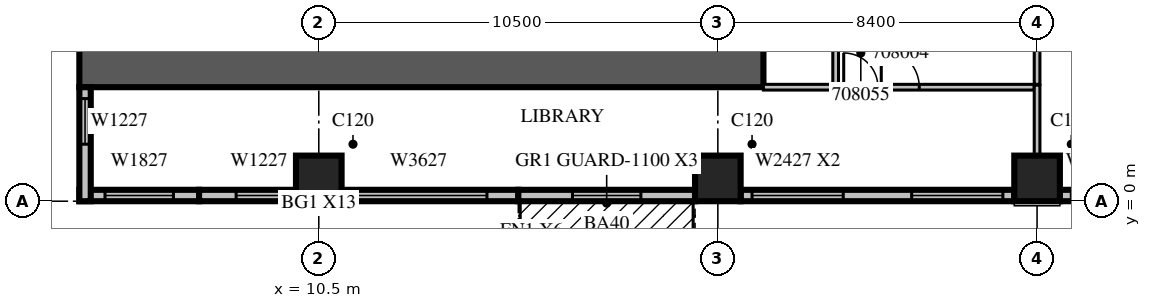
"""IFC4 building model, lengths in metres.
Left out: names, types, materials, properties, quantities, classifications, styles, units other than length and angle.
Written with IfcOpenShell. Run it as: python <this file> out.ifc"""

import sys

from ifc_helpers import new_model, si_unit, direction, frame, frame_2d, origin, origin_2d, place, context, subcontext, project, spatial, rectangle, extrude, source, transform, mapped, element, fill, save


model = new_model("IFC4")
c1 = context("Model", 3, precision=1e-05, world=origin(), true_north=direction((0.0, 1.0)))
c2 = subcontext(c1, "Body", "Model", "MODEL_VIEW")
j1 = project(units=[si_unit("LENGTHUNIT", "METRE"), si_unit("PLANEANGLEUNIT", "RADIAN")], contexts=[c1])
p1 = place(None, origin())
s1 = spatial("IfcSite", under=j1, at=p1, CompositionType="ELEMENT")
p2 = place(p1, origin())
s2 = spatial("IfcBuilding", under=s1, at=p2, CompositionType="ELEMENT")
p3 = place(p2, frame((0.0, 0.0, 44.7)))
s3 = spatial("IfcBuildingStorey", under=s2, at=p3, CompositionType="ELEMENT", Elevation=44.7)
m1 = source(origin(), c2, "Body", "SweptSolid", [
    extrude(rectangle(XDim=1.2, YDim=1.2, at=origin_2d()), origin(), (0.0, 0.0, 1.0), 4.2),
])
for number, where, z_axis, x_axis in (
    (1, (10.5, 0.6, 0.0), (0.0, 0.0, 1.0), (1.0, 0.0, 0.0)),
    (2, (21.0, 0.6, 0.0), (0.0, 0.0, 1.0), (1.0, 0.0, 0.0)),
    (3, (29.4, 0.6, 0.0), (0.0, 0.0, 1.0), (1.0, 0.0, 0.0)),
):
    element("IfcColumn", number, at=place(p3, frame(where, z_axis=z_axis, x_axis=x_axis)), inside=s3, PredefinedType="COLUMN", context=c2, shape_type="MappedRepresentation", body=[
        mapped(m1, transform((0.0, 0.0, 0.0), scale=1.0)),
    ])
m2 = source(origin(), c2, "Body", "SweptSolid", [
    extrude(rectangle(XDim=18.0, YDim=1.2, at=frame_2d((9.0, 0.0))), origin(), (0.0, 0.0, 1.0), 4.2),
])
p4 = place(p3, frame((4.2, 3.6, 0.0), z_axis=(0.0, 0.0, 1.0), x_axis=(1.0, 0.0, 0.0)))
e4 = element("IfcWall", 4, at=p4, inside=s3, PredefinedType="SHEAR", context=c2, shape_type="MappedRepresentation", body=[
    mapped(m2, transform((0.0, 0.0, 0.0), scale=1.0)),
])
m3 = source(origin(), c2, "Body", "SweptSolid", [
    extrude(rectangle(XDim=3.15, YDim=0.3, at=frame_2d((1.575, 0.0))), origin(), (0.0, 0.0, 1.0), 3.8),
])
p5 = place(p3, frame((4.2, 0.15, 0.0), z_axis=(0.0, 0.0, 1.0), x_axis=(1.0, 0.0, 0.0)))
e5 = element("IfcWall", 5, at=p5, inside=s3, PredefinedType="STANDARD", context=c2, shape_type="MappedRepresentation", body=[
    mapped(m3, transform((0.0, 0.0, 0.0), scale=1.0)),
])
m4 = source(origin(), c2, "Body", "SweptSolid", [
    extrude(rectangle(XDim=1.8, YDim=2.7, at=frame_2d((0.9, 1.35))), frame((0.0, 0.16, 0.0), z_axis=(0.0, -1.0, 0.0), x_axis=(1.0, 0.0, 0.0)), (0.0, 0.0, 1.0), 0.32),
])
p6 = place(p5, frame((0.675, 0.0, 0.6)))
e6 = element("IfcOpeningElement", 6, at=p6, cuts=e5, PredefinedType="OPENING", context=c2, shape_type="MappedRepresentation", body=[
    mapped(m4, transform((0.0, 0.0, 0.0), scale=1.0)),
])
m5 = source(origin(), c2, "Body", "SweptSolid", [
    extrude(rectangle(XDim=2.55, YDim=0.3, at=frame_2d((1.275, 0.0))), origin(), (0.0, 0.0, 1.0), 3.8),
])
p7 = place(p3, frame((7.35, 0.15, 0.0), z_axis=(0.0, 0.0, 1.0), x_axis=(1.0, 0.0, 0.0)))
e7 = element("IfcWall", 7, at=p7, inside=s3, PredefinedType="STANDARD", context=c2, shape_type="MappedRepresentation", body=[
    mapped(m5, transform((0.0, 0.0, 0.0), scale=1.0)),
])
m6 = source(origin(), c2, "Body", "SweptSolid", [
    extrude(rectangle(XDim=1.2, YDim=2.7, at=frame_2d((0.6, 1.35))), frame((0.0, 0.16, 0.0), z_axis=(0.0, -1.0, 0.0), x_axis=(1.0, 0.0, 0.0)), (0.0, 0.0, 1.0), 0.32),
])
p8 = place(p7, frame((0.975, 0.0, 0.6)))
e8 = element("IfcOpeningElement", 8, at=p8, cuts=e7, PredefinedType="OPENING", context=c2, shape_type="MappedRepresentation", body=[
    mapped(m6, transform((0.0, 0.0, 0.0), scale=1.0)),
])
m7 = source(origin(), c2, "Body", "SweptSolid", [
    extrude(rectangle(XDim=4.65, YDim=0.3, at=frame_2d((2.325, 0.0))), origin(), (0.0, 0.0, 1.0), 3.8),
])
p9 = place(p3, frame((11.1, 0.15, 0.0), z_axis=(0.0, 0.0, 1.0), x_axis=(1.0, 0.0, 0.0)))
e9 = element("IfcWall", 9, at=p9, inside=s3, PredefinedType="STANDARD", context=c2, shape_type="MappedRepresentation", body=[
    mapped(m7, transform((0.0, 0.0, 0.0), scale=1.0)),
])
m8 = source(origin(), c2, "Body", "SweptSolid", [
    extrude(rectangle(XDim=3.6, YDim=2.7, at=frame_2d((1.8, 1.35))), frame((0.0, 0.16, 0.0), z_axis=(0.0, -1.0, 0.0), x_axis=(1.0, 0.0, 0.0)), (0.0, 0.0, 1.0), 0.32),
])
p10 = place(p9, frame((0.225, 0.0, 0.6)))
e10 = element("IfcOpeningElement", 10, at=p10, cuts=e9, PredefinedType="OPENING", context=c2, shape_type="MappedRepresentation", body=[
    mapped(m8, transform((0.0, 0.0, 0.0), scale=1.0)),
])
p11 = place(p3, frame((15.75, 0.15, 0.0), z_axis=(0.0, 0.0, 1.0), x_axis=(1.0, 0.0, 0.0)))
e11 = element("IfcWall", 11, at=p11, inside=s3, PredefinedType="STANDARD", context=c2, shape_type="MappedRepresentation", body=[
    mapped(m7, transform((0.0, 0.0, 0.0), scale=1.0)),
])
m9 = source(origin(), c2, "Body", "SweptSolid", [
    extrude(rectangle(XDim=1.8, YDim=2.4, at=frame_2d((0.9, 1.2))), frame((0.0, 0.16, 0.0), z_axis=(0.0, -1.0, 0.0), x_axis=(1.0, 0.0, 0.0)), (0.0, 0.0, 1.0), 0.32),
])
p12 = place(p11, frame((1.425, 0.0, 0.0)))
e12 = element("IfcOpeningElement", 12, at=p12, cuts=e11, PredefinedType="OPENING", context=c2, shape_type="MappedRepresentation", body=[
    mapped(m9, transform((0.0, 0.0, 0.0), scale=1.0)),
])
m10 = source(origin(), c2, "Body", "SweptSolid", [
    extrude(rectangle(XDim=7.2, YDim=0.3, at=frame_2d((3.6, 0.0))), origin(), (0.0, 0.0, 1.0), 3.8),
])
p13 = place(p3, frame((21.6, 0.15, 0.0), z_axis=(0.0, 0.0, 1.0), x_axis=(1.0, 0.0, 0.0)))
e13 = element("IfcWall", 13, at=p13, inside=s3, PredefinedType="STANDARD", context=c2, shape_type="MappedRepresentation", body=[
    mapped(m10, transform((0.0, 0.0, 0.0), scale=1.0)),
])
m11 = source(origin(), c2, "Body", "SweptSolid", [
    extrude(rectangle(XDim=2.4, YDim=2.7, at=frame_2d((1.2, 1.35))), frame((0.0, 0.16, 0.0), z_axis=(0.0, -1.0, 0.0), x_axis=(1.0, 0.0, 0.0)), (0.0, 0.0, 1.0), 0.32),
])
p14 = place(p13, frame((0.3, 0.0, 0.6)))
e14 = element("IfcOpeningElement", 14, at=p14, cuts=e13, PredefinedType="OPENING", context=c2, shape_type="MappedRepresentation", body=[
    mapped(m11, transform((0.0, 0.0, 0.0), scale=1.0)),
])
p15 = place(p13, frame((4.5, 0.0, 0.6)))
e15 = element("IfcOpeningElement", 15, at=p15, cuts=e13, PredefinedType="OPENING", context=c2, shape_type="MappedRepresentation", body=[
    mapped(m11, transform((0.0, 0.0, 0.0), scale=1.0)),
])
m12 = source(origin(), c2, "Body", "SweptSolid", [
    extrude(rectangle(XDim=1.8, YDim=0.3, at=frame_2d((0.9, 0.0))), origin(), (0.0, 0.0, 1.0), 3.8),
])
p16 = place(p3, frame((30.0, 0.15, 0.0), z_axis=(0.0, 0.0, 1.0), x_axis=(1.0, 0.0, 0.0)))
e16 = element("IfcWall", 16, at=p16, inside=s3, PredefinedType="STANDARD", context=c2, shape_type="MappedRepresentation", body=[
    mapped(m12, transform((0.0, 0.0, 0.0), scale=1.0)),
])
p17 = place(p16, frame((0.3, 0.0, 0.6)))
e17 = element("IfcOpeningElement", 17, at=p17, cuts=e16, PredefinedType="OPENING", context=c2, shape_type="MappedRepresentation", body=[
    mapped(m6, transform((0.0, 0.0, 0.0), scale=1.0)),
])
m13 = source(origin(), c2, "Body", "SweptSolid", [
    extrude(rectangle(XDim=3.0, YDim=0.3, at=frame_2d((1.5, 0.0))), origin(), (0.0, 0.0, 1.0), 3.8),
])
p18 = place(p3, frame((4.35, 3.0, 0.0), z_axis=(0.0, 0.0, 1.0), x_axis=(0.0, -1.0, 0.0)))
e18 = element("IfcWall", 18, at=p18, inside=s3, PredefinedType="STANDARD", context=c2, shape_type="MappedRepresentation", body=[
    mapped(m13, transform((0.0, 0.0, 0.0), scale=1.0)),
])
p19 = place(p18, frame((0.3, 0.0, 0.6)))
e19 = element("IfcOpeningElement", 19, at=p19, cuts=e18, PredefinedType="OPENING", context=c2, shape_type="MappedRepresentation", body=[
    mapped(m6, transform((0.0, 0.0, 0.0), scale=1.0)),
])
m14 = source(origin(), c2, "Body", "SweptSolid", [
    extrude(rectangle(XDim=11.925, YDim=0.15, at=frame_2d((5.963, 0.0))), origin(), (0.0, 0.0, 1.0), 3.8),
])
p20 = place(p3, frame((24.1, 15.0, 0.0), z_axis=(0.0, 0.0, 1.0), x_axis=(0.0, -1.0, 0.0)))
e20 = element("IfcWall", 20, at=p20, inside=s3, PredefinedType="PARTITIONING", context=c2, shape_type="MappedRepresentation", body=[
    mapped(m14, transform((0.0, 0.0, 0.0), scale=1.0)),
])
m15 = source(origin(), c2, "Body", "SweptSolid", [
    extrude(rectangle(XDim=0.9, YDim=2.1, at=frame_2d((0.45, 1.05))), frame((0.0, 0.085, 0.0), z_axis=(0.0, -1.0, 0.0), x_axis=(1.0, 0.0, 0.0)), (0.0, 0.0, 1.0), 0.17),
])
p21 = place(p20, frame((9.562, 0.0, 0.0)))
e21 = element("IfcOpeningElement", 21, at=p21, cuts=e20, PredefinedType="OPENING", context=c2, shape_type="MappedRepresentation", body=[
    mapped(m15, transform((0.0, 0.0, 0.0), scale=1.0)),
])
p22 = place(p20, frame((2.725, 0.0, 0.0)))
e22 = element("IfcOpeningElement", 22, at=p22, cuts=e20, PredefinedType="OPENING", context=c2, shape_type="MappedRepresentation", body=[
    mapped(m15, transform((0.0, 0.0, 0.0), scale=1.0)),
])
m16 = source(origin(), c2, "Body", "SweptSolid", [
    extrude(rectangle(XDim=6.826, YDim=0.15, at=frame_2d((3.413, 0.0))), origin(), (0.0, 0.0, 1.0), 3.8),
])
p23 = place(p3, frame((29.4, 3.075, 0.0), z_axis=(0.0, 0.0, 1.0), x_axis=(0.0, 1.0, 0.0)))
e23 = element("IfcWall", 23, at=p23, inside=s3, PredefinedType="PARTITIONING", context=c2, shape_type="MappedRepresentation", body=[
    mapped(m16, transform((0.0, 0.0, 0.0), scale=1.0)),
])
m17 = source(origin(), c2, "Body", "SweptSolid", [
    extrude(rectangle(XDim=7.125, YDim=0.15, at=frame_2d((3.562, 0.0))), origin(), (0.0, 0.0, 1.0), 3.8),
])
p24 = place(p3, frame((22.2, 3.0, 0.0), z_axis=(0.0, 0.0, 1.0), x_axis=(1.0, 0.0, 0.0)))
e24 = element("IfcWall", 24, at=p24, inside=s3, PredefinedType="PARTITIONING", context=c2, shape_type="MappedRepresentation", body=[
    mapped(m17, transform((0.0, 0.0, 0.0), scale=1.0)),
])
m18 = source(origin(), c2, "Body", "SweptSolid", [
    extrude(rectangle(XDim=1.0, YDim=2.1, at=frame_2d((0.5, 1.05))), frame((0.0, 0.085, 0.0), z_axis=(0.0, -1.0, 0.0), x_axis=(1.0, 0.0, 0.0)), (0.0, 0.0, 1.0), 0.17),
])
p25 = place(p24, frame((3.1, 0.0, 0.0)))
e25 = element("IfcOpeningElement", 25, at=p25, cuts=e24, PredefinedType="OPENING", context=c2, shape_type="MappedRepresentation", body=[
    mapped(m18, transform((0.0, 0.0, 0.0), scale=1.0)),
])
p26 = place(p24, frame((2.112, 0.0, 0.0)))
e26 = element("IfcOpeningElement", 26, at=p26, cuts=e24, PredefinedType="OPENING", context=c2, shape_type="MappedRepresentation", body=[
    mapped(m15, transform((0.0, 0.0, 0.0), scale=1.0)),
])
m19 = source(origin(), c2, "Body", "SweptSolid", [
    extrude(rectangle(XDim=1.856, YDim=0.15, at=frame_2d((0.928, 0.0))), origin(), (0.0, 0.0, 1.0), 3.8),
])
p27 = place(p3, frame((29.4, 1.199, 0.0), z_axis=(0.0, 0.0, 1.0), x_axis=(0.0, 1.0, 0.0)))
e27 = element("IfcWall", 27, at=p27, inside=s3, PredefinedType="PARTITIONING", context=c2, shape_type="MappedRepresentation", body=[
    mapped(m19, transform((0.0, 0.0, 0.0), scale=1.0)),
])
m20 = source(origin(), c2, "Body", "SweptSolid", [
    extrude(rectangle(XDim=1.8, YDim=2.7, at=frame_2d((0.9, 1.35))), frame((0.0, 0.03, 0.0), z_axis=(0.0, -1.0, 0.0), x_axis=(1.0, 0.0, 0.0)), (0.0, 0.0, 1.0), 0.06),
])
p28 = place(p6, origin())
e28 = element("IfcWindow", 28, at=p28, inside=s3, PartitioningType="SINGLE_PANEL", PredefinedType="WINDOW", context=c2, shape_type="MappedRepresentation", body=[
    mapped(m20, transform((0.0, 0.0, 0.0), scale=1.0)),
])
fill(e6, e28)
m21 = source(origin(), c2, "Body", "SweptSolid", [
    extrude(rectangle(XDim=1.2, YDim=2.7, at=frame_2d((0.6, 1.35))), frame((0.0, 0.03, 0.0), z_axis=(0.0, -1.0, 0.0), x_axis=(1.0, 0.0, 0.0)), (0.0, 0.0, 1.0), 0.06),
])
p29 = place(p8, origin())
e29 = element("IfcWindow", 29, at=p29, inside=s3, PartitioningType="SINGLE_PANEL", PredefinedType="WINDOW", context=c2, shape_type="MappedRepresentation", body=[
    mapped(m21, transform((0.0, 0.0, 0.0), scale=1.0)),
])
fill(e8, e29)
m22 = source(origin(), c2, "Body", "SweptSolid", [
    extrude(rectangle(XDim=3.6, YDim=2.7, at=frame_2d((1.8, 1.35))), frame((0.0, 0.03, 0.0), z_axis=(0.0, -1.0, 0.0), x_axis=(1.0, 0.0, 0.0)), (0.0, 0.0, 1.0), 0.06),
])
p30 = place(p10, origin())
e30 = element("IfcWindow", 30, at=p30, inside=s3, PartitioningType="SINGLE_PANEL", PredefinedType="WINDOW", context=c2, shape_type="MappedRepresentation", body=[
    mapped(m22, transform((0.0, 0.0, 0.0), scale=1.0)),
])
fill(e10, e30)
m23 = source(origin(), c2, "Body", "SweptSolid", [
    extrude(rectangle(XDim=1.8, YDim=2.4, at=frame_2d((0.9, 1.2))), frame((0.0, 0.025, 0.0), z_axis=(0.0, -1.0, 0.0), x_axis=(1.0, 0.0, 0.0)), (0.0, 0.0, 1.0), 0.05),
])
p31 = place(p12, origin())
e31 = element("IfcDoor", 31, at=p31, inside=s3, OperationType="SLIDING_TO_LEFT", PredefinedType="DOOR", context=c2, shape_type="MappedRepresentation", body=[
    mapped(m23, transform((0.0, 0.0, 0.0), scale=1.0)),
])
fill(e12, e31)
m24 = source(origin(), c2, "Body", "SweptSolid", [
    extrude(rectangle(XDim=2.4, YDim=2.7, at=frame_2d((1.2, 1.35))), frame((0.0, 0.03, 0.0), z_axis=(0.0, -1.0, 0.0), x_axis=(1.0, 0.0, 0.0)), (0.0, 0.0, 1.0), 0.06),
])
p32 = place(p14, origin())
e32 = element("IfcWindow", 32, at=p32, inside=s3, PartitioningType="SINGLE_PANEL", PredefinedType="WINDOW", context=c2, shape_type="MappedRepresentation", body=[
    mapped(m24, transform((0.0, 0.0, 0.0), scale=1.0)),
])
fill(e14, e32)
p33 = place(p15, origin())
e33 = element("IfcWindow", 33, at=p33, inside=s3, PartitioningType="SINGLE_PANEL", PredefinedType="WINDOW", context=c2, shape_type="MappedRepresentation", body=[
    mapped(m24, transform((0.0, 0.0, 0.0), scale=1.0)),
])
fill(e15, e33)
p34 = place(p17, origin())
e34 = element("IfcWindow", 34, at=p34, inside=s3, PartitioningType="SINGLE_PANEL", PredefinedType="WINDOW", context=c2, shape_type="MappedRepresentation", body=[
    mapped(m21, transform((0.0, 0.0, 0.0), scale=1.0)),
])
fill(e17, e34)
p35 = place(p19, origin())
e35 = element("IfcWindow", 35, at=p35, inside=s3, PartitioningType="SINGLE_PANEL", PredefinedType="WINDOW", context=c2, shape_type="MappedRepresentation", body=[
    mapped(m21, transform((0.0, 0.0, 0.0), scale=1.0)),
])
fill(e19, e35)
m25 = source(origin(), c2, "Body", "SweptSolid", [
    extrude(rectangle(XDim=1.0, YDim=2.1, at=frame_2d((0.5, 1.05))), frame((0.0, 0.025, 0.0), z_axis=(0.0, -1.0, 0.0), x_axis=(1.0, 0.0, 0.0)), (0.0, 0.0, 1.0), 0.05),
])
p36 = place(p25, origin())
e36 = element("IfcDoor", 36, at=p36, inside=s3, OperationType="SINGLE_SWING_LEFT", PredefinedType="DOOR", context=c2, shape_type="MappedRepresentation", body=[
    mapped(m25, transform((0.0, 0.0, 0.0), scale=1.0)),
])
fill(e25, e36)
m26 = source(origin(), c2, "Body", "SweptSolid", [
    extrude(rectangle(XDim=0.9, YDim=2.1, at=frame_2d((0.45, 1.05))), frame((0.0, 0.025, 0.0), z_axis=(0.0, -1.0, 0.0), x_axis=(1.0, 0.0, 0.0)), (0.0, 0.0, 1.0), 0.05),
])
p37 = place(p26, origin())
e37 = element("IfcDoor", 37, at=p37, inside=s3, OperationType="SINGLE_SWING_LEFT", PredefinedType="DOOR", context=c2, shape_type="MappedRepresentation", body=[
    mapped(m26, transform((0.0, 0.0, 0.0), scale=1.0)),
])
fill(e26, e37)
save(model, sys.argv[1])
